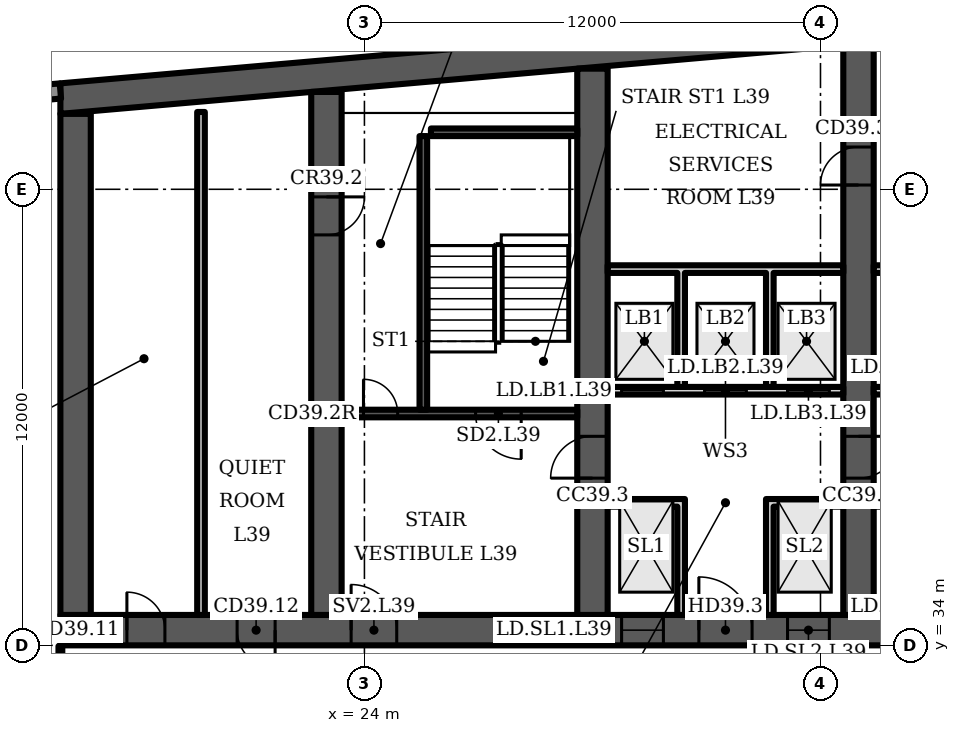
"""IFC4 building model, lengths in metres.
Left out: names, types, materials, properties, quantities, classifications, styles, units other than length and angle.
Written with IfcOpenShell. Run it as: python <this file> out.ifc"""

import sys

from ifc_helpers import new_model, si_unit, direction, frame, frame_2d, origin, place, context, subcontext, project, spatial, polyline, rectangle, outline, extrude, element, fill, save


model = new_model("IFC4")
c1 = context("Model", 3, precision=1e-05, world=origin(), true_north=direction((0.0, 1.0)))
c2 = subcontext(c1, "Body", "Model", "MODEL_VIEW")
j1 = project(units=[si_unit("LENGTHUNIT", "METRE"), si_unit("PLANEANGLEUNIT", "RADIAN")], contexts=[c1])
p1 = place(None, origin())
s1 = spatial("IfcSite", under=j1, at=p1, CompositionType="ELEMENT")
p2 = place(p1, origin())
s2 = spatial("IfcBuilding", under=s1, at=p2, CompositionType="ELEMENT")
p3 = place(p2, frame((0.0, 0.0, 162.7)))
s3 = spatial("IfcBuildingStorey", under=s2, at=p3, CompositionType="ELEMENT", Elevation=162.7)
p4 = place(p3, origin())
e1 = element("IfcWall", 1, at=p4, inside=s3, PredefinedType="SHEAR", context=c2, shape_type="SweptSolid", body=[
    extrude(outline(polyline([(16.0, 47.984), (37.0, 49.822), (58.0, 47.984), (58.0, 48.787), (37.0, 50.625), (16.0, 48.787), (16.0, 47.984)])), origin(), (0.0, 0.0, 1.0), 3.6),
])
p5 = place(p3, frame((16.0, 34.4, 0.0), z_axis=(0.0, 0.0, 1.0), x_axis=(1.0, 0.0, 0.0)))
e2 = element("IfcWall", 2, at=p5, inside=s3, PredefinedType="SHEAR", context=c2, shape_type="SweptSolid", body=[
    extrude(rectangle(XDim=42.0, YDim=0.8, at=frame_2d((21.0, 0.0))), origin(), (0.0, 0.0, 1.0), 3.6),
])
p6 = place(p5, frame((1.75, 0.0, 0.0)))
e3 = element("IfcOpeningElement", 3, at=p6, cuts=e2, PredefinedType="OPENING", context=c2, shape_type="SweptSolid", body=[
    extrude(rectangle(XDim=1.0, YDim=2.1, at=frame_2d((0.5, 1.05))), frame((0.0, 0.41, 0.0), z_axis=(0.0, -1.0, 0.0), x_axis=(1.0, 0.0, 0.0)), (0.0, 0.0, 1.0), 0.82),
])
p7 = place(p5, frame((4.65, 0.0, 0.0)))
e4 = element("IfcOpeningElement", 4, at=p7, cuts=e2, PredefinedType="OPENING", context=c2, shape_type="SweptSolid", body=[
    extrude(rectangle(XDim=1.0, YDim=2.1, at=frame_2d((0.5, 1.05))), frame((0.0, 0.41, 0.0), z_axis=(0.0, -1.0, 0.0), x_axis=(1.0, 0.0, 0.0)), (0.0, 0.0, 1.0), 0.82),
])
p8 = place(p5, frame((7.65, 0.0, 0.0)))
e5 = element("IfcOpeningElement", 5, at=p8, cuts=e2, PredefinedType="OPENING", context=c2, shape_type="SweptSolid", body=[
    extrude(rectangle(XDim=1.2, YDim=2.1, at=frame_2d((0.6, 1.05))), frame((0.0, 0.41, 0.0), z_axis=(0.0, -1.0, 0.0), x_axis=(1.0, 0.0, 0.0)), (0.0, 0.0, 1.0), 0.82),
])
p9 = place(p5, frame((14.767, 0.0, 0.0)))
e6 = element("IfcOpeningElement", 6, at=p9, cuts=e2, PredefinedType="OPENING", context=c2, shape_type="SweptSolid", body=[
    extrude(rectangle(XDim=1.1, YDim=2.1, at=frame_2d((0.55, 1.05))), frame((0.0, 0.41, 0.0), z_axis=(0.0, -1.0, 0.0), x_axis=(1.0, 0.0, 0.0)), (0.0, 0.0, 1.0), 0.82),
])
p10 = place(p5, frame((19.133, 0.0, 0.0)))
e7 = element("IfcOpeningElement", 7, at=p10, cuts=e2, PredefinedType="OPENING", context=c2, shape_type="SweptSolid", body=[
    extrude(rectangle(XDim=1.1, YDim=2.1, at=frame_2d((0.55, 1.05))), frame((0.0, 0.41, 0.0), z_axis=(0.0, -1.0, 0.0), x_axis=(1.0, 0.0, 0.0)), (0.0, 0.0, 1.0), 0.82),
])
p11 = place(p5, frame((16.8, 0.0, 0.0)))
e8 = element("IfcOpeningElement", 8, at=p11, cuts=e2, PredefinedType="OPENING", context=c2, shape_type="SweptSolid", body=[
    extrude(rectangle(XDim=1.4, YDim=2.1, at=frame_2d((0.7, 1.05))), frame((0.0, 0.41, 0.0), z_axis=(0.0, -1.0, 0.0), x_axis=(1.0, 0.0, 0.0)), (0.0, 0.0, 1.0), 0.82),
])
p12 = place(p5, frame((21.767, 0.0, 0.0)))
e9 = element("IfcOpeningElement", 9, at=p12, cuts=e2, PredefinedType="OPENING", context=c2, shape_type="SweptSolid", body=[
    extrude(rectangle(XDim=1.1, YDim=2.1, at=frame_2d((0.55, 1.05))), frame((0.0, 0.41, 0.0), z_axis=(0.0, -1.0, 0.0), x_axis=(1.0, 0.0, 0.0)), (0.0, 0.0, 1.0), 0.82),
])
p13 = place(p5, frame((23.95, 0.0, 0.0)))
e10 = element("IfcOpeningElement", 10, at=p13, cuts=e2, PredefinedType="OPENING", context=c2, shape_type="SweptSolid", body=[
    extrude(rectangle(XDim=1.1, YDim=2.1, at=frame_2d((0.55, 1.05))), frame((0.0, 0.41, 0.0), z_axis=(0.0, -1.0, 0.0), x_axis=(1.0, 0.0, 0.0)), (0.0, 0.0, 1.0), 0.82),
])
p14 = place(p5, frame((26.133, 0.0, 0.0)))
e11 = element("IfcOpeningElement", 11, at=p14, cuts=e2, PredefinedType="OPENING", context=c2, shape_type="SweptSolid", body=[
    extrude(rectangle(XDim=1.1, YDim=2.1, at=frame_2d((0.55, 1.05))), frame((0.0, 0.41, 0.0), z_axis=(0.0, -1.0, 0.0), x_axis=(1.0, 0.0, 0.0)), (0.0, 0.0, 1.0), 0.82),
])
p15 = place(p5, frame((33.15, 0.0, 0.0)))
e12 = element("IfcOpeningElement", 12, at=p15, cuts=e2, PredefinedType="OPENING", context=c2, shape_type="SweptSolid", body=[
    extrude(rectangle(XDim=1.2, YDim=2.1, at=frame_2d((0.6, 1.05))), frame((0.0, 0.41, 0.0), z_axis=(0.0, -1.0, 0.0), x_axis=(1.0, 0.0, 0.0)), (0.0, 0.0, 1.0), 0.82),
])
p16 = place(p5, frame((35.817, 0.0, 0.0)))
e13 = element("IfcOpeningElement", 13, at=p16, cuts=e2, PredefinedType="OPENING", context=c2, shape_type="SweptSolid", body=[
    extrude(rectangle(XDim=1.0, YDim=2.1, at=frame_2d((0.5, 1.05))), frame((0.0, 0.41, 0.0), z_axis=(0.0, -1.0, 0.0), x_axis=(1.0, 0.0, 0.0)), (0.0, 0.0, 1.0), 0.82),
])
p17 = place(p5, frame((39.95, 0.0, 0.0)))
e14 = element("IfcOpeningElement", 14, at=p17, cuts=e2, PredefinedType="OPENING", context=c2, shape_type="SweptSolid", body=[
    extrude(rectangle(XDim=1.0, YDim=2.1, at=frame_2d((0.5, 1.05))), frame((0.0, 0.41, 0.0), z_axis=(0.0, -1.0, 0.0), x_axis=(1.0, 0.0, 0.0)), (0.0, 0.0, 1.0), 0.82),
])
p18 = place(p5, frame((37.767, 0.0, 0.0)))
e15 = element("IfcOpeningElement", 15, at=p18, cuts=e2, PredefinedType="OPENING", context=c2, shape_type="SweptSolid", body=[
    extrude(rectangle(XDim=1.4, YDim=2.1, at=frame_2d((0.7, 1.05))), frame((0.0, 0.41, 0.0), z_axis=(0.0, -1.0, 0.0), x_axis=(1.0, 0.0, 0.0)), (0.0, 0.0, 1.0), 0.82),
])
p19 = place(p3, frame((16.4, 34.8, 0.0), z_axis=(0.0, 0.0, 1.0), x_axis=(0.0, 1.0, 0.0)))
e16 = element("IfcWall", 16, at=p19, inside=s3, PredefinedType="SHEAR", context=c2, shape_type="SweptSolid", body=[
    extrude(rectangle(XDim=13.184, YDim=0.8, at=frame_2d((6.592, 0.0))), origin(), (0.0, 0.0, 1.0), 3.6),
])
p20 = place(p3, frame((23.0, 34.8, 0.0), z_axis=(0.0, 0.0, 1.0), x_axis=(0.0, 1.0, 0.0)))
e17 = element("IfcWall", 17, at=p20, inside=s3, PredefinedType="SHEAR", context=c2, shape_type="SweptSolid", body=[
    extrude(rectangle(XDim=13.762, YDim=0.8, at=frame_2d((6.881, 0.0))), origin(), (0.0, 0.0, 1.0), 3.6),
])
p21 = place(p20, frame((10.0, 0.0, 0.0)))
e18 = element("IfcOpeningElement", 18, at=p21, cuts=e17, PredefinedType="OPENING", context=c2, shape_type="SweptSolid", body=[
    extrude(rectangle(XDim=1.0, YDim=2.1, at=frame_2d((0.5, 1.05))), frame((0.0, 0.41, 0.0), z_axis=(0.0, -1.0, 0.0), x_axis=(1.0, 0.0, 0.0)), (0.0, 0.0, 1.0), 0.82),
])
p22 = place(p3, frame((30.0, 34.8, 0.0), z_axis=(0.0, 0.0, 1.0), x_axis=(0.0, 1.0, 0.0)))
e19 = element("IfcWall", 19, at=p22, inside=s3, PredefinedType="SHEAR", context=c2, shape_type="SweptSolid", body=[
    extrude(rectangle(XDim=14.374, YDim=0.8, at=frame_2d((7.187, 0.0))), origin(), (0.0, 0.0, 1.0), 3.6),
])
p23 = place(p22, frame((3.6, 0.0, 0.0)))
e20 = element("IfcOpeningElement", 20, at=p23, cuts=e19, PredefinedType="OPENING", context=c2, shape_type="SweptSolid", body=[
    extrude(rectangle(XDim=1.1, YDim=2.1, at=frame_2d((0.55, 1.05))), frame((0.0, 0.41, 0.0), z_axis=(0.0, -1.0, 0.0), x_axis=(1.0, 0.0, 0.0)), (0.0, 0.0, 1.0), 0.82),
])
p24 = place(p3, frame((37.0, 34.8, 0.0), z_axis=(0.0, 0.0, 1.0), x_axis=(0.0, 1.0, 0.0)))
e21 = element("IfcWall", 21, at=p24, inside=s3, PredefinedType="SHEAR", context=c2, shape_type="SweptSolid", body=[
    extrude(rectangle(XDim=14.987, YDim=0.8, at=frame_2d((7.493, 0.0))), origin(), (0.0, 0.0, 1.0), 3.6),
])
p25 = place(p24, frame((11.312, 0.0, 0.0)))
e22 = element("IfcOpeningElement", 22, at=p25, cuts=e21, PredefinedType="OPENING", context=c2, shape_type="SweptSolid", body=[
    extrude(rectangle(XDim=1.0, YDim=2.1, at=frame_2d((0.5, 1.05))), frame((0.0, 0.41, 0.0), z_axis=(0.0, -1.0, 0.0), x_axis=(1.0, 0.0, 0.0)), (0.0, 0.0, 1.0), 0.82),
])
p26 = place(p24, frame((3.6, 0.0, 0.0)))
e23 = element("IfcOpeningElement", 23, at=p26, cuts=e21, PredefinedType="OPENING", context=c2, shape_type="SweptSolid", body=[
    extrude(rectangle(XDim=1.1, YDim=2.1, at=frame_2d((0.55, 1.05))), frame((0.0, 0.41, 0.0), z_axis=(0.0, -1.0, 0.0), x_axis=(1.0, 0.0, 0.0)), (0.0, 0.0, 1.0), 0.82),
])
p27 = place(p3, frame((16.0, 48.587, 0.0), z_axis=(0.0, 0.0, 1.0), x_axis=(-0.996194, -0.087168, 0.0)))
e24 = element("IfcWall", 24, at=p27, inside=s3, PredefinedType="SOLIDWALL", context=c2, shape_type="SweptSolid", body=[
    extrude(rectangle(XDim=2.994, YDim=0.4, at=frame_2d((1.497, 0.0))), origin(), (0.0, 0.0, 1.0), 3.2),
])
p28 = place(p3, frame((19.7, 34.8, 0.0), z_axis=(0.0, 0.0, 1.0), x_axis=(0.0, 1.0, 0.0)))
e25 = element("IfcWall", 25, at=p28, inside=s3, PredefinedType="PARTITIONING", context=c2, shape_type="SweptSolid", body=[
    extrude(rectangle(XDim=13.234, YDim=0.2, at=frame_2d((6.617, 0.0))), origin(), (0.0, 0.0, 1.0), 3.2),
])
p29 = place(p3, frame((23.4, 40.1, 0.0), z_axis=(0.0, 0.0, 1.0), x_axis=(1.0, 0.0, 0.0)))
e26 = element("IfcWall", 26, at=p29, inside=s3, PredefinedType="SHEAR", context=c2, shape_type="SweptSolid", body=[
    extrude(rectangle(XDim=6.2, YDim=0.2, at=frame_2d((3.1, 0.0))), origin(), (0.0, 0.0, 1.0), 3.2),
])
p30 = place(p29, frame((3.525, 0.0, 0.0)))
e27 = element("IfcOpeningElement", 27, at=p30, cuts=e26, PredefinedType="OPENING", context=c2, shape_type="SweptSolid", body=[
    extrude(rectangle(XDim=1.2, YDim=2.1, at=frame_2d((0.6, 1.05))), frame((0.0, 0.11, 0.0), z_axis=(0.0, -1.0, 0.0), x_axis=(1.0, 0.0, 0.0)), (0.0, 0.0, 1.0), 0.22),
])
p31 = place(p29, frame((0.575, 0.0, 0.0)))
e28 = element("IfcOpeningElement", 28, at=p31, cuts=e26, PredefinedType="OPENING", context=c2, shape_type="SweptSolid", body=[
    extrude(rectangle(XDim=0.9, YDim=2.1, at=frame_2d((0.45, 1.05))), frame((0.0, 0.11, 0.0), z_axis=(0.0, -1.0, 0.0), x_axis=(1.0, 0.0, 0.0)), (0.0, 0.0, 1.0), 0.22),
])
p32 = place(p3, frame((25.55, 40.2, 0.0), z_axis=(0.0, 0.0, 1.0), x_axis=(0.0, 1.0, 0.0)))
e29 = element("IfcWall", 29, at=p32, inside=s3, PredefinedType="SHEAR", context=c2, shape_type="SweptSolid", body=[
    extrude(rectangle(XDim=7.2, YDim=0.2, at=frame_2d((3.6, 0.0))), origin(), (0.0, 0.0, 1.0), 3.2),
])
p33 = place(p3, frame((25.75, 47.5, 0.0), z_axis=(0.0, 0.0, 1.0), x_axis=(1.0, 0.0, 0.0)))
e30 = element("IfcWall", 30, at=p33, inside=s3, PredefinedType="SHEAR", context=c2, shape_type="SweptSolid", body=[
    extrude(rectangle(XDim=3.85, YDim=0.2, at=frame_2d((1.925, 0.0))), origin(), (0.0, 0.0, 1.0), 3.2),
])
p34 = place(p3, frame((30.4, 40.7, 0.0), z_axis=(0.0, 0.0, 1.0), x_axis=(1.0, 0.0, 0.0)))
e31 = element("IfcWall", 31, at=p34, inside=s3, PredefinedType="PARTITIONING", context=c2, shape_type="SweptSolid", body=[
    extrude(rectangle(XDim=6.2, YDim=0.2, at=frame_2d((3.1, 0.0))), origin(), (0.0, 0.0, 1.0), 3.2),
])
p35 = place(p34, frame((0.367, 0.0, 0.0)))
e32 = element("IfcOpeningElement", 32, at=p35, cuts=e31, PredefinedType="OPENING", context=c2, shape_type="SweptSolid", body=[
    extrude(rectangle(XDim=1.1, YDim=2.1, at=frame_2d((0.55, 1.05))), frame((0.0, 0.11, 0.0), z_axis=(0.0, -1.0, 0.0), x_axis=(1.0, 0.0, 0.0)), (0.0, 0.0, 1.0), 0.22),
])
p36 = place(p34, frame((2.55, 0.0, 0.0)))
e33 = element("IfcOpeningElement", 33, at=p36, cuts=e31, PredefinedType="OPENING", context=c2, shape_type="SweptSolid", body=[
    extrude(rectangle(XDim=1.1, YDim=2.1, at=frame_2d((0.55, 1.05))), frame((0.0, 0.11, 0.0), z_axis=(0.0, -1.0, 0.0), x_axis=(1.0, 0.0, 0.0)), (0.0, 0.0, 1.0), 0.22),
])
p37 = place(p34, frame((4.733, 0.0, 0.0)))
e34 = element("IfcOpeningElement", 34, at=p37, cuts=e31, PredefinedType="OPENING", context=c2, shape_type="SweptSolid", body=[
    extrude(rectangle(XDim=1.1, YDim=2.1, at=frame_2d((0.55, 1.05))), frame((0.0, 0.11, 0.0), z_axis=(0.0, -1.0, 0.0), x_axis=(1.0, 0.0, 0.0)), (0.0, 0.0, 1.0), 0.22),
])
p38 = place(p3, frame((0.0, 0.0, -0.0)))
e35 = element("IfcWall", 35, at=p38, inside=s3, PredefinedType="PARTITIONING", context=c2, shape_type="SweptSolid", body=[
    extrude(outline(polyline([(32.233, 37.65), (30.4, 37.65), (30.4, 37.85), (32.233, 37.85), (32.433, 37.85), (32.433, 34.8), (32.233, 34.8), (32.233, 37.65)])), origin(), (0.0, 0.0, 1.0), 3.2),
])
p39 = place(p3, frame((0.0, 0.0, -0.0)))
e36 = element("IfcWall", 36, at=p39, inside=s3, PredefinedType="PARTITIONING", context=c2, shape_type="SweptSolid", body=[
    extrude(outline(polyline([(34.567, 37.85), (34.767, 37.85), (36.6, 37.85), (36.6, 37.65), (34.767, 37.65), (34.767, 34.8), (34.567, 34.8), (34.567, 37.85)])), origin(), (0.0, 0.0, 1.0), 3.2),
])
p40 = place(p3, frame((0.0, 0.0, -0.0)))
e37 = element("IfcWall", 37, at=p40, inside=s3, PredefinedType="PARTITIONING", context=c2, shape_type="SweptSolid", body=[
    extrude(outline(polyline([(32.433, 40.8), (32.233, 40.8), (32.233, 43.8), (30.4, 43.8), (30.4, 44.0), (36.6, 44.0), (36.6, 43.8), (34.767, 43.8), (34.767, 40.8), (34.567, 40.8), (34.567, 43.8), (32.433, 43.8), (32.433, 40.8)])), origin(), (0.0, 0.0, 1.0), 3.2),
])
p41 = place(p3, frame((37.4, 40.7, 0.0), z_axis=(0.0, 0.0, 1.0), x_axis=(1.0, 0.0, 0.0)))
e38 = element("IfcWall", 38, at=p41, inside=s3, PredefinedType="PARTITIONING", context=c2, shape_type="SweptSolid", body=[
    extrude(rectangle(XDim=6.2, YDim=0.2, at=frame_2d((3.1, 0.0))), origin(), (0.0, 0.0, 1.0), 3.2),
])
p42 = place(p41, frame((0.367, 0.0, 0.0)))
e39 = element("IfcOpeningElement", 39, at=p42, cuts=e38, PredefinedType="OPENING", context=c2, shape_type="SweptSolid", body=[
    extrude(rectangle(XDim=1.1, YDim=2.1, at=frame_2d((0.55, 1.05))), frame((0.0, 0.11, 0.0), z_axis=(0.0, -1.0, 0.0), x_axis=(1.0, 0.0, 0.0)), (0.0, 0.0, 1.0), 0.22),
])
p43 = place(p41, frame((2.55, 0.0, 0.0)))
e40 = element("IfcOpeningElement", 40, at=p43, cuts=e38, PredefinedType="OPENING", context=c2, shape_type="SweptSolid", body=[
    extrude(rectangle(XDim=1.1, YDim=2.1, at=frame_2d((0.55, 1.05))), frame((0.0, 0.11, 0.0), z_axis=(0.0, -1.0, 0.0), x_axis=(1.0, 0.0, 0.0)), (0.0, 0.0, 1.0), 0.22),
])
p44 = place(p41, frame((4.733, 0.0, 0.0)))
e41 = element("IfcOpeningElement", 41, at=p44, cuts=e38, PredefinedType="OPENING", context=c2, shape_type="SweptSolid", body=[
    extrude(rectangle(XDim=1.1, YDim=2.1, at=frame_2d((0.55, 1.05))), frame((0.0, 0.11, 0.0), z_axis=(0.0, -1.0, 0.0), x_axis=(1.0, 0.0, 0.0)), (0.0, 0.0, 1.0), 0.22),
])
p45 = place(p3, frame((0.0, 0.0, -0.0)))
e42 = element("IfcWall", 42, at=p45, inside=s3, PredefinedType="PARTITIONING", context=c2, shape_type="SweptSolid", body=[
    extrude(outline(polyline([(41.567, 37.1), (39.433, 37.1), (39.433, 34.8), (39.233, 34.8), (39.233, 37.65), (37.4, 37.65), (37.4, 37.85), (39.233, 37.85), (39.433, 37.85), (39.433, 37.3), (41.567, 37.3), (41.567, 37.55), (41.767, 37.55), (43.6, 37.55), (43.6, 37.35), (41.767, 37.35), (41.767, 34.8), (41.567, 34.8), (41.567, 37.1)])), origin(), (0.0, 0.0, 1.0), 3.2),
])
p46 = place(p3, frame((0.0, 0.0, -0.0)))
e43 = element("IfcWall", 43, at=p46, inside=s3, PredefinedType="PARTITIONING", context=c2, shape_type="SweptSolid", body=[
    extrude(outline(polyline([(39.433, 40.8), (39.233, 40.8), (39.233, 43.8), (37.4, 43.8), (37.4, 44.0), (43.6, 44.0), (43.6, 43.8), (41.767, 43.8), (41.767, 40.8), (41.567, 40.8), (41.567, 43.8), (39.433, 43.8), (39.433, 40.8)])), origin(), (0.0, 0.0, 1.0), 3.2),
])
p47 = place(p3, frame((37.0, 30.5, 0.0), z_axis=(0.0, 0.0, 1.0), x_axis=(0.0, 1.0, 0.0)))
e44 = element("IfcWall", 44, at=p47, inside=s3, PredefinedType="PARTITIONING", context=c2, shape_type="SweptSolid", body=[
    extrude(rectangle(XDim=3.5, YDim=0.2, at=frame_2d((1.75, 0.0))), origin(), (0.0, 0.0, 1.0), 3.2),
])
p48 = place(p47, frame((1.2, 0.0, 0.0)))
e45 = element("IfcOpeningElement", 45, at=p48, cuts=e44, PredefinedType="OPENING", context=c2, shape_type="SweptSolid", body=[
    extrude(rectangle(XDim=1.1, YDim=2.1, at=frame_2d((0.55, 1.05))), frame((0.0, 0.11, 0.0), z_axis=(0.0, -1.0, 0.0), x_axis=(1.0, 0.0, 0.0)), (0.0, 0.0, 1.0), 0.22),
])
p49 = place(p3, frame((16.0, 30.5, 0.0), z_axis=(0.0, 0.0, 1.0), x_axis=(0.0, 1.0, 0.0)))
e46 = element("IfcWall", 46, at=p49, inside=s3, PredefinedType="PARTITIONING", context=c2, shape_type="SweptSolid", body=[
    extrude(rectangle(XDim=3.48, YDim=0.1, at=frame_2d((1.74, 0.0))), origin(), (0.0, 0.0, 1.0), 3.2),
])
p50 = place(p6, origin())
e47 = element("IfcDoor", 47, at=p50, inside=s3, OperationType="SINGLE_SWING_LEFT", PredefinedType="DOOR", context=c2, shape_type="SweptSolid", body=[
    extrude(rectangle(XDim=1.0, YDim=2.1, at=frame_2d((0.5, 1.05))), frame((0.0, 0.4, 0.0), z_axis=(0.0, -1.0, 0.0), x_axis=(1.0, 0.0, 0.0)), (0.0, 0.0, 1.0), 0.8),
])
fill(e3, e47)
p51 = place(p7, origin())
e48 = element("IfcDoor", 48, at=p51, inside=s3, OperationType="SINGLE_SWING_RIGHT", PredefinedType="DOOR", context=c2, shape_type="SweptSolid", body=[
    extrude(rectangle(XDim=1.0, YDim=2.1, at=frame_2d((0.5, 1.05))), frame((0.0, 0.4, 0.0), z_axis=(0.0, -1.0, 0.0), x_axis=(1.0, 0.0, 0.0)), (0.0, 0.0, 1.0), 0.8),
])
fill(e4, e48)
p52 = place(p30, origin())
e49 = element("IfcDoor", 49, at=p52, inside=s3, OperationType="SINGLE_SWING_RIGHT", PredefinedType="DOOR", context=c2, shape_type="SweptSolid", body=[
    extrude(rectangle(XDim=1.2, YDim=2.1, at=frame_2d((0.6, 1.05))), frame((0.0, 0.025, 0.0), z_axis=(0.0, -1.0, 0.0), x_axis=(1.0, 0.0, 0.0)), (0.0, 0.0, 1.0), 0.05),
])
fill(e27, e49)
p53 = place(p31, origin())
e50 = element("IfcDoor", 50, at=p53, inside=s3, OperationType="SINGLE_SWING_LEFT", PredefinedType="DOOR", context=c2, shape_type="SweptSolid", body=[
    extrude(rectangle(XDim=0.9, YDim=2.1, at=frame_2d((0.45, 1.05))), frame((0.0, 0.025, 0.0), z_axis=(0.0, -1.0, 0.0), x_axis=(1.0, 0.0, 0.0)), (0.0, 0.0, 1.0), 0.05),
])
fill(e28, e50)
p54 = place(p8, origin())
e51 = element("IfcDoor", 51, at=p54, inside=s3, OperationType="SINGLE_SWING_LEFT", PredefinedType="DOOR", context=c2, shape_type="SweptSolid", body=[
    extrude(rectangle(XDim=1.2, YDim=2.1, at=frame_2d((0.6, 1.05))), frame((0.0, 0.025, 0.0), z_axis=(0.0, -1.0, 0.0), x_axis=(1.0, 0.0, 0.0)), (0.0, 0.0, 1.0), 0.05),
])
fill(e5, e51)
p55 = place(p9, origin())
e52 = element("IfcDoor", 52, at=p55, inside=s3, OperationType="DOUBLE_DOOR_SLIDING", PredefinedType="DOOR", context=c2, shape_type="SweptSolid", body=[
    extrude(rectangle(XDim=1.1, YDim=2.1, at=frame_2d((0.55, 1.05))), frame((0.0, 0.025, 0.0), z_axis=(0.0, -1.0, 0.0), x_axis=(1.0, 0.0, 0.0)), (0.0, 0.0, 1.0), 0.05),
])
fill(e6, e52)
p56 = place(p10, origin())
e53 = element("IfcDoor", 53, at=p56, inside=s3, OperationType="DOUBLE_DOOR_SLIDING", PredefinedType="DOOR", context=c2, shape_type="SweptSolid", body=[
    extrude(rectangle(XDim=1.1, YDim=2.1, at=frame_2d((0.55, 1.05))), frame((0.0, 0.025, 0.0), z_axis=(0.0, -1.0, 0.0), x_axis=(1.0, 0.0, 0.0)), (0.0, 0.0, 1.0), 0.05),
])
fill(e7, e53)
p57 = place(p11, origin())
e54 = element("IfcDoor", 54, at=p57, inside=s3, OperationType="DOUBLE_DOOR_SINGLE_SWING", PredefinedType="DOOR", context=c2, shape_type="SweptSolid", body=[
    extrude(rectangle(XDim=1.4, YDim=2.1, at=frame_2d((0.7, 1.05))), frame((0.0, 0.025, 0.0), z_axis=(0.0, -1.0, 0.0), x_axis=(1.0, 0.0, 0.0)), (0.0, 0.0, 1.0), 0.05),
])
fill(e8, e54)
p58 = place(p35, origin())
e55 = element("IfcDoor", 55, at=p58, inside=s3, OperationType="DOUBLE_DOOR_SLIDING", PredefinedType="DOOR", context=c2, shape_type="SweptSolid", body=[
    extrude(rectangle(XDim=1.1, YDim=2.1, at=frame_2d((0.55, 1.05))), frame((0.0, 0.025, 0.0), z_axis=(0.0, -1.0, 0.0), x_axis=(1.0, 0.0, 0.0)), (0.0, 0.0, 1.0), 0.05),
])
fill(e32, e55)
p59 = place(p36, origin())
e56 = element("IfcDoor", 56, at=p59, inside=s3, OperationType="DOUBLE_DOOR_SLIDING", PredefinedType="DOOR", context=c2, shape_type="SweptSolid", body=[
    extrude(rectangle(XDim=1.1, YDim=2.1, at=frame_2d((0.55, 1.05))), frame((0.0, 0.025, 0.0), z_axis=(0.0, -1.0, 0.0), x_axis=(1.0, 0.0, 0.0)), (0.0, 0.0, 1.0), 0.05),
])
fill(e33, e56)
p60 = place(p37, origin())
e57 = element("IfcDoor", 57, at=p60, inside=s3, OperationType="DOUBLE_DOOR_SLIDING", PredefinedType="DOOR", context=c2, shape_type="SweptSolid", body=[
    extrude(rectangle(XDim=1.1, YDim=2.1, at=frame_2d((0.55, 1.05))), frame((0.0, 0.025, 0.0), z_axis=(0.0, -1.0, 0.0), x_axis=(1.0, 0.0, 0.0)), (0.0, 0.0, 1.0), 0.05),
])
fill(e34, e57)
p61 = place(p25, origin())
e58 = element("IfcDoor", 58, at=p61, inside=s3, OperationType="SINGLE_SWING_LEFT", PredefinedType="DOOR", context=c2, shape_type="SweptSolid", body=[
    extrude(rectangle(XDim=1.0, YDim=2.1, at=frame_2d((0.5, 1.05))), frame((0.0, 0.4, 0.0), z_axis=(0.0, -1.0, 0.0), x_axis=(1.0, 0.0, 0.0)), (0.0, 0.0, 1.0), 0.8),
])
fill(e22, e58)
p62 = place(p21, origin())
e59 = element("IfcDoor", 59, at=p62, inside=s3, OperationType="SINGLE_SWING_RIGHT", PredefinedType="DOOR", context=c2, shape_type="SweptSolid", body=[
    extrude(rectangle(XDim=1.0, YDim=2.1, at=frame_2d((0.5, 1.05))), frame((0.0, 0.4, 0.0), z_axis=(0.0, -1.0, 0.0), x_axis=(1.0, 0.0, 0.0)), (0.0, 0.0, 1.0), 0.8),
])
fill(e18, e59)
p63 = place(p23, origin())
e60 = element("IfcDoor", 60, at=p63, inside=s3, OperationType="SINGLE_SWING_LEFT", PredefinedType="DOOR", context=c2, shape_type="SweptSolid", body=[
    extrude(rectangle(XDim=1.1, YDim=2.1, at=frame_2d((0.55, 1.05))), frame((0.0, 0.025, 0.0), z_axis=(0.0, -1.0, 0.0), x_axis=(1.0, 0.0, 0.0)), (0.0, 0.0, 1.0), 0.05),
])
fill(e20, e60)
p64 = place(p26, origin())
e61 = element("IfcDoor", 61, at=p64, inside=s3, OperationType="SINGLE_SWING_RIGHT", PredefinedType="DOOR", context=c2, shape_type="SweptSolid", body=[
    extrude(rectangle(XDim=1.1, YDim=2.1, at=frame_2d((0.55, 1.05))), frame((0.0, 0.025, 0.0), z_axis=(0.0, -1.0, 0.0), x_axis=(1.0, 0.0, 0.0)), (0.0, 0.0, 1.0), 0.05),
])
fill(e23, e61)
save(model, sys.argv[1])
